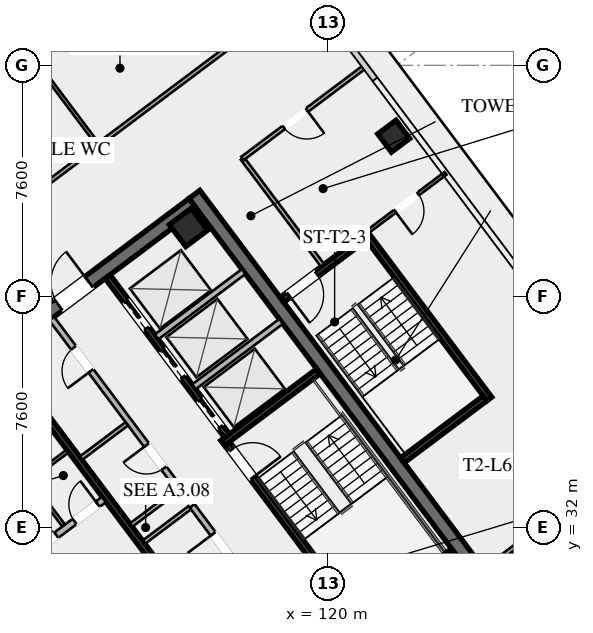
"""IFC4 building model, lengths in metres.
Left out: names, types, materials, properties, quantities, classifications, styles, units other than length and angle.
Written with IfcOpenShell. Run it as: python <this file> out.ifc"""

import sys

from ifc_helpers import new_model, si_unit, direction, frame, frame_2d, origin, origin_2d, place, context, subcontext, project, spatial, rectangle, hollow_rectangle, extrude, element, fill, save


model = new_model("IFC4")
c1 = context("Model", 3, precision=1e-05, world=origin(), true_north=direction((0.0, 1.0)))
c2 = subcontext(c1, "Body", "Model", "MODEL_VIEW")
j1 = project(units=[si_unit("LENGTHUNIT", "METRE"), si_unit("PLANEANGLEUNIT", "RADIAN")], contexts=[c1])
p1 = place(None, origin())
s1 = spatial("IfcSite", under=j1, at=p1, CompositionType="ELEMENT")
p2 = place(p1, origin())
s2 = spatial("IfcBuilding", under=s1, at=p2, CompositionType="ELEMENT")
p3 = place(p2, frame((0.0, 0.0, 232.6)))
s3 = spatial("IfcBuildingStorey", under=s2, at=p3, CompositionType="ELEMENT", Elevation=232.6)
for number, where, z_axis, x_axis in (
    (1, (112.396, 21.047, 0.0), (0.0, 0.0, 1.0), (-0.6, 0.8, 0.0)),
    (2, (115.604, 42.953, 0.0), (0.0, 0.0, 1.0), (0.6, -0.8, 0.0)),
):
    element("IfcWall", number, at=place(p3, frame(where, z_axis=z_axis, x_axis=x_axis)), inside=s3, PredefinedType="SHEAR", context=c2, shape_type="SweptSolid", body=[
        extrude(rectangle(XDim=15.6, YDim=0.45, at=frame_2d((7.8, 0.0))), origin(), (0.0, 0.0, 1.0), 3.55),
    ])
p4 = place(p3, frame((103.351, 33.482, 0.0), z_axis=(0.0, 0.0, 1.0), x_axis=(0.8, 0.6, 0.0)))
e3 = element("IfcWall", 3, at=p4, inside=s3, PredefinedType="SHEAR", context=c2, shape_type="SweptSolid", body=[
    extrude(rectangle(XDim=15.26, YDim=0.45, at=frame_2d((7.63, 0.0))), origin(), (0.0, 0.0, 1.0), 3.55),
])
p5 = place(p4, frame((4.68, 0.0, 0.0)))
e4 = element("IfcOpeningElement", 4, at=p5, cuts=e3, PredefinedType="OPENING", context=c2, shape_type="SweptSolid", body=[
    extrude(rectangle(XDim=1.25, YDim=2.25, at=frame_2d((0.625, 1.125))), frame((0.0, 0.235, 0.0), z_axis=(0.0, -1.0, 0.0), x_axis=(1.0, 0.0, 0.0)), (0.0, 0.0, 1.0), 0.47),
])
p6 = place(p4, frame((9.73, 0.0, 0.0)))
e5 = element("IfcOpeningElement", 5, at=p6, cuts=e3, PredefinedType="OPENING", context=c2, shape_type="SweptSolid", body=[
    extrude(rectangle(XDim=1.25, YDim=2.25, at=frame_2d((0.625, 1.125))), frame((0.0, 0.235, 0.0), z_axis=(0.0, -1.0, 0.0), x_axis=(1.0, 0.0, 0.0)), (0.0, 0.0, 1.0), 0.47),
])
for number, where, z_axis, x_axis in (
    (6, (123.87, 30.59, 0.0), (0.0, 0.0, 1.0), (0.8, 0.6, 0.0)),
    (7, (115.41, 41.87, 0.0), (0.0, 0.0, 1.0), (0.8, 0.6, 0.0)),
):
    element("IfcColumn", number, at=place(p3, frame(where, z_axis=z_axis, x_axis=x_axis)), inside=s3, PredefinedType="COLUMN", context=c2, shape_type="SweptSolid", body=[
        extrude(hollow_rectangle(XDim=0.9, YDim=0.9, WallThickness=0.04, at=origin_2d()), origin(), (0.0, 0.0, 1.0), 3.37),
    ])
p7 = place(p3, frame((122.16, 44.87, -0.175), z_axis=(0.0, 0.0, 1.0), x_axis=(0.799999996291, 0.600000004945, 0.0)))
e8 = element("IfcColumn", 8, at=p7, inside=s3, PredefinedType="COLUMN", context=c2, shape_type="SweptSolid", body=[
    extrude(hollow_rectangle(XDim=0.75, YDim=0.75, WallThickness=0.032, at=origin_2d()), origin(), (0.0, 0.0, 1.0), 3.545),
])
p8 = place(p3, frame((111.44, 29.08, 0.0), z_axis=(0.0, 0.0, 1.0), x_axis=(-0.59999041401, 0.800007189403, 0.0)))
e9 = element("IfcWall", 9, at=p8, inside=s3, PredefinedType="SHEAR", context=c2, shape_type="SweptSolid", body=[
    extrude(rectangle(XDim=8.15, YDim=0.2, at=frame_2d((4.075, 0.0))), origin(), (0.0, 0.0, 1.0), 3.37),
])
p9 = place(p8, frame((0.45, 0.0, 0.0)))
e10 = element("IfcOpeningElement", 10, at=p9, cuts=e9, PredefinedType="OPENING", context=c2, shape_type="SweptSolid", body=[
    extrude(rectangle(XDim=1.15, YDim=2.2, at=frame_2d((0.575, 1.1))), frame((0.0, 0.11, 0.0), z_axis=(0.0, -1.0, 0.0), x_axis=(1.0, 0.0, 0.0)), (0.0, 0.0, 1.0), 0.22),
])
p10 = place(p3, frame((116.56, 34.92, 0.0), z_axis=(0.0, 0.0, 1.0), x_axis=(0.59999041401, -0.800007189403, 0.0)))
e11 = element("IfcWall", 11, at=p10, inside=s3, PredefinedType="SHEAR", context=c2, shape_type="SweptSolid", body=[
    extrude(rectangle(XDim=8.15, YDim=0.2, at=frame_2d((4.075, 0.0))), origin(), (0.0, 0.0, 1.0), 3.37),
])
p11 = place(p10, frame((0.45, 0.0, 0.0)))
e12 = element("IfcOpeningElement", 12, at=p11, cuts=e11, PredefinedType="OPENING", context=c2, shape_type="SweptSolid", body=[
    extrude(rectangle(XDim=1.15, YDim=2.2, at=frame_2d((0.575, 1.1))), frame((0.0, 0.11, 0.0), z_axis=(0.0, -1.0, 0.0), x_axis=(1.0, 0.0, 0.0)), (0.0, 0.0, 1.0), 0.22),
])
for number, where, z_axis, x_axis in (
    (13, (116.54, 34.78, 0.0), (0.0, 0.0, 1.0), (0.8, 0.6, 0.0)),
    (14, (120.98, 28.86, 0.0), (0.0, 0.0, 1.0), (0.8, 0.6, 0.0)),
):
    element("IfcWall", number, at=place(p3, frame(where, z_axis=z_axis, x_axis=x_axis)), inside=s3, PredefinedType="SHEAR", context=c2, shape_type="SweptSolid", body=[
        extrude(rectangle(XDim=3.93, YDim=0.2, at=frame_2d((1.965, 0.0))), origin(), (0.0, 0.0, 1.0), 3.37),
    ])
p12 = place(p3, frame((118.058, 25.856, 0.0), z_axis=(0.0, 0.0, 1.0), x_axis=(-0.600002657301, 0.799998007018, 0.0)))
e15 = element("IfcWall", 15, at=p12, inside=s3, PredefinedType="SHEAR", context=c2, shape_type="SweptSolid", body=[
    extrude(rectangle(XDim=14.7, YDim=0.2, at=frame_2d((7.35, 0.0))), origin(), (0.0, 0.0, 1.0), 3.37),
])
p13 = place(p3, frame((110.104, 31.028, 0.0), z_axis=(0.0, 0.0, 1.0), x_axis=(0.800018601094, 0.59997519774, 0.0)))
e16 = element("IfcWall", 16, at=p13, inside=s3, PredefinedType="SOLIDWALL", context=c2, shape_type="SweptSolid", body=[
    extrude(rectangle(XDim=3.15, YDim=0.22, at=frame_2d((1.575, 0.0))), origin(), (0.0, 0.0, 1.0), 2.723),
])
p14 = place(p13, frame((0.25, 0.0, 0.0)))
e17 = element("IfcOpeningElement", 17, at=p14, cuts=e16, PredefinedType="OPENING", context=c2, shape_type="SweptSolid", body=[
    extrude(rectangle(XDim=0.95, YDim=2.05, at=frame_2d((0.475, 1.025))), frame((0.0, 0.12, 0.0), z_axis=(0.0, -1.0, 0.0), x_axis=(1.0, 0.0, 0.0)), (0.0, 0.0, 1.0), 0.24),
])
p15 = place(p13, frame((1.95, 0.0, 0.0)))
e18 = element("IfcOpeningElement", 18, at=p15, cuts=e16, PredefinedType="OPENING", context=c2, shape_type="SweptSolid", body=[
    extrude(rectangle(XDim=0.95, YDim=2.05, at=frame_2d((0.475, 1.025))), frame((0.0, 0.12, 0.0), z_axis=(0.0, -1.0, 0.0), x_axis=(1.0, 0.0, 0.0)), (0.0, 0.0, 1.0), 0.24),
])
p16 = place(p3, frame((112.75, 40.25, 0.0), z_axis=(0.0, 0.0, 1.0), x_axis=(0.599994036198, -0.800004472816, 0.0)))
e19 = element("IfcWall", 19, at=p16, inside=s3, PredefinedType="SHEAR", context=c2, shape_type="SweptSolid", body=[
    extrude(rectangle(XDim=6.55, YDim=0.2, at=frame_2d((3.275, 0.0))), origin(), (0.0, 0.0, 1.0), 3.37),
])
p17 = place(p16, frame((5.075, 0.0, 0.0)))
e20 = element("IfcOpeningElement", 20, at=p17, cuts=e19, PredefinedType="OPENING", context=c2, shape_type="SweptSolid", body=[
    extrude(rectangle(XDim=1.1, YDim=2.2, at=frame_2d((0.55, 1.1))), frame((0.0, 0.11, 0.0), z_axis=(0.0, -1.0, 0.0), x_axis=(1.0, 0.0, 0.0)), (0.0, 0.0, 1.0), 0.22),
])
p18 = place(p16, frame((3.025, 0.0, 0.0)))
e21 = element("IfcOpeningElement", 21, at=p18, cuts=e19, PredefinedType="OPENING", context=c2, shape_type="SweptSolid", body=[
    extrude(rectangle(XDim=1.1, YDim=2.2, at=frame_2d((0.55, 1.1))), frame((0.0, 0.11, 0.0), z_axis=(0.0, -1.0, 0.0), x_axis=(1.0, 0.0, 0.0)), (0.0, 0.0, 1.0), 0.22),
])
p19 = place(p16, frame((1.025, 0.0, 0.0)))
e22 = element("IfcOpeningElement", 22, at=p19, cuts=e19, PredefinedType="OPENING", context=c2, shape_type="SweptSolid", body=[
    extrude(rectangle(XDim=1.1, YDim=2.2, at=frame_2d((0.55, 1.1))), frame((0.0, 0.11, 0.0), z_axis=(0.0, -1.0, 0.0), x_axis=(1.0, 0.0, 0.0)), (0.0, 0.0, 1.0), 0.22),
])
for number, where, z_axis, x_axis in (
    (23, (115.59, 36.63, 0.0), (0.0, 0.0, 1.0), (0.8, 0.6, 0.0)),
    (24, (114.36, 38.27, 0.0), (0.0, 0.0, 1.0), (0.8, 0.6, 0.0)),
):
    element("IfcWall", number, at=place(p3, frame(where, z_axis=z_axis, x_axis=x_axis)), inside=s3, PredefinedType="SOLIDWALL", context=c2, shape_type="SweptSolid", body=[
        extrude(rectangle(XDim=3.58, YDim=0.2, at=frame_2d((1.79, 0.0))), origin(), (0.0, 0.0, 1.0), 3.37),
    ])
p20 = place(p3, frame((111.296, 32.072, 0.0), z_axis=(0.0, 0.0, 1.0), x_axis=(-0.59995887973, 0.800030838552, 0.0)))
e25 = element("IfcWall", 25, at=p20, inside=s3, PredefinedType="PARTITIONING", context=c2, shape_type="SweptSolid", body=[
    extrude(rectangle(XDim=3.8, YDim=0.11, at=frame_2d((1.9, 0.0))), origin(), (0.0, 0.0, 1.0), 2.723),
])
p21 = place(p3, frame((108.91, 32.62, 0.0), z_axis=(0.0, 0.0, 1.0), x_axis=(0.800018601094, 0.59997519774, 0.0)))
e26 = element("IfcWall", 26, at=p21, inside=s3, PredefinedType="PARTITIONING", context=c2, shape_type="SweptSolid", body=[
    extrude(rectangle(XDim=3.15, YDim=0.11, at=frame_2d((1.575, 0.0))), origin(), (0.0, 0.0, 1.0), 2.723),
])
p22 = place(p3, frame((119.73, 27.11, 0.0), z_axis=(0.0, 0.0, 1.0), x_axis=(-0.600005580459, 0.799995814625, 0.0)))
e27 = element("IfcWall", 27, at=p22, inside=s3, PredefinedType="SOLIDWALL", context=c2, shape_type="SweptSolid", body=[
    extrude(rectangle(XDim=7.0, YDim=0.2, at=frame_2d((3.5, 0.0))), origin(), (0.0, 0.0, 1.0), 2.723),
])
p23 = place(p22, frame((0.85, 0.0, 0.0)))
e28 = element("IfcOpeningElement", 28, at=p23, cuts=e27, PredefinedType="OPENING", context=c2, shape_type="SweptSolid", body=[
    extrude(rectangle(XDim=0.95, YDim=2.05, at=frame_2d((0.475, 1.025))), frame((0.0, 0.11, 0.0), z_axis=(0.0, -1.0, 0.0), x_axis=(1.0, 0.0, 0.0)), (0.0, 0.0, 1.0), 0.22),
])
p24 = place(p22, frame((4.8, 0.0, 0.0)))
e29 = element("IfcOpeningElement", 29, at=p24, cuts=e27, PredefinedType="OPENING", context=c2, shape_type="SweptSolid", body=[
    extrude(rectangle(XDim=1.05, YDim=2.2, at=frame_2d((0.525, 1.1))), frame((0.0, 0.11, 0.0), z_axis=(0.0, -1.0, 0.0), x_axis=(1.0, 0.0, 0.0)), (0.0, 0.0, 1.0), 0.22),
])
p25 = place(p3, frame((113.946, 31.522, 0.0), z_axis=(0.0, 0.0, 1.0), x_axis=(0.8, 0.6, 0.0)))
e30 = element("IfcWall", 30, at=p25, inside=s3, PredefinedType="PARTITIONING", context=c2, shape_type="SweptSolid", body=[
    extrude(rectangle(XDim=1.88, YDim=0.135, at=frame_2d((0.94, 0.0))), origin(), (0.0, 0.0, 1.0), 2.723),
])
p26 = place(p3, frame((115.11, 33.27, 0.0), z_axis=(0.0, 0.0, 1.0), x_axis=(-0.600011160345, 0.79999162962, 0.0)))
e31 = element("IfcWall", 31, at=p26, inside=s3, PredefinedType="SOLIDWALL", context=c2, shape_type="SweptSolid", body=[
    extrude(rectangle(XDim=7.0, YDim=0.2, at=frame_2d((3.5, 0.0))), origin(), (0.0, 0.0, 1.0), 2.723),
])
p27 = place(p26, frame((0.85, 0.0, 0.0)))
e32 = element("IfcOpeningElement", 32, at=p27, cuts=e31, PredefinedType="OPENING", context=c2, shape_type="SweptSolid", body=[
    extrude(rectangle(XDim=0.95, YDim=2.05, at=frame_2d((0.475, 1.025))), frame((0.0, 0.11, 0.0), z_axis=(0.0, -1.0, 0.0), x_axis=(1.0, 0.0, 0.0)), (0.0, 0.0, 1.0), 0.22),
])
p28 = place(p26, frame((4.85, 0.0, 0.0)))
e33 = element("IfcOpeningElement", 33, at=p28, cuts=e31, PredefinedType="OPENING", context=c2, shape_type="SweptSolid", body=[
    extrude(rectangle(XDim=0.95, YDim=2.05, at=frame_2d((0.475, 1.025))), frame((0.0, 0.11, 0.0), z_axis=(0.0, -1.0, 0.0), x_axis=(1.0, 0.0, 0.0)), (0.0, 0.0, 1.0), 0.22),
])
p29 = place(p3, frame((113.526, 32.082, 0.0), z_axis=(0.0, 0.0, 1.0), x_axis=(0.800046745961, 0.599937666993, 0.0)))
e34 = element("IfcWall", 34, at=p29, inside=s3, PredefinedType="PARTITIONING", context=c2, shape_type="SweptSolid", body=[
    extrude(rectangle(XDim=1.88, YDim=0.135, at=frame_2d((0.94, 0.0))), origin(), (0.0, 0.0, 1.0), 2.723),
])
p30 = place(p3, frame((111.876, 34.282, 0.0), z_axis=(0.0, 0.0, 1.0), x_axis=(0.8, 0.6, 0.0)))
e35 = element("IfcWall", 35, at=p30, inside=s3, PredefinedType="PARTITIONING", context=c2, shape_type="SweptSolid", body=[
    extrude(rectangle(XDim=1.88, YDim=0.135, at=frame_2d((0.94, 0.0))), origin(), (0.0, 0.0, 1.0), 2.723),
])
p31 = place(p3, frame((125.304, 36.228, 0.0), z_axis=(0.0, 0.0, 1.0), x_axis=(-0.59998851072, 0.800008616831, 0.0)))
e36 = element("IfcWall", 36, at=p31, inside=s3, PredefinedType="SHEAR", context=c2, shape_type="SweptSolid", body=[
    extrude(rectangle(XDim=6.8, YDim=0.2, at=frame_2d((3.4, 0.0))), origin(), (0.0, 0.0, 1.0), 3.37),
])
p32 = place(p3, frame((121.204, 41.528, 0.0), z_axis=(0.0, 0.0, 1.0), x_axis=(-0.800017232136, -0.599977023131, 0.0)))
e37 = element("IfcWall", 37, at=p32, inside=s3, PredefinedType="SHEAR", context=c2, shape_type="SweptSolid", body=[
    extrude(rectangle(XDim=3.4, YDim=0.2, at=frame_2d((1.7, 0.0))), origin(), (0.0, 0.0, 1.0), 3.37),
])
p33 = place(p32, frame((1.975, 0.0, 0.0)))
e38 = element("IfcOpeningElement", 38, at=p33, cuts=e37, PredefinedType="OPENING", context=c2, shape_type="SweptSolid", body=[
    extrude(rectangle(XDim=1.15, YDim=2.2, at=frame_2d((0.575, 1.1))), frame((0.0, 0.11, 0.0), z_axis=(0.0, -1.0, 0.0), x_axis=(1.0, 0.0, 0.0)), (0.0, 0.0, 1.0), 0.22),
])
p34 = place(p3, frame((122.444, 34.208, 0.0), z_axis=(0.0, 0.0, 1.0), x_axis=(0.79999138319, 0.600011488909, 0.0)))
e39 = element("IfcWall", 39, at=p34, inside=s3, PredefinedType="SHEAR", context=c2, shape_type="SweptSolid", body=[
    extrude(rectangle(XDim=3.4, YDim=0.2, at=frame_2d((1.7, 0.0))), origin(), (0.0, 0.0, 1.0), 3.37),
])
p35 = place(p3, frame((119.824, 40.618, 0.0), z_axis=(0.0, 0.0, 1.0), x_axis=(-0.599982243973, 0.800013316712, 0.0)))
e40 = element("IfcWall", 40, at=p35, inside=s3, PredefinedType="PARTITIONING", context=c2, shape_type="SweptSolid", body=[
    extrude(rectangle(XDim=4.4, YDim=0.135, at=frame_2d((2.2, 0.0))), origin(), (0.0, 0.0, 1.0), 2.723),
])
p36 = place(p3, frame((99.736, 35.052, 0.0), z_axis=(0.0, 0.0, 1.0), x_axis=(0.799997387685, 0.600003483071, 0.0)))
e41 = element("IfcWall", 41, at=p36, inside=s3, PredefinedType="PARTITIONING", context=c2, shape_type="SweptSolid", body=[
    extrude(rectangle(XDim=22.43, YDim=0.135, at=frame_2d((11.215, 0.0))), origin(), (0.0, 0.0, 1.0), 2.723),
])
p37 = place(p36, frame((0.3, 0.0, 0.0)))
e42 = element("IfcOpeningElement", 42, at=p37, cuts=e41, PredefinedType="OPENING", context=c2, shape_type="SweptSolid", body=[
    extrude(rectangle(XDim=0.95, YDim=2.05, at=frame_2d((0.475, 1.025))), frame((0.0, 0.077, 0.0), z_axis=(0.0, -1.0, 0.0), x_axis=(1.0, 0.0, 0.0)), (0.0, 0.0, 1.0), 0.155),
])
p38 = place(p36, frame((9.423, 0.0, 0.0)))
e43 = element("IfcOpeningElement", 43, at=p38, cuts=e41, PredefinedType="OPENING", context=c2, shape_type="SweptSolid", body=[
    extrude(rectangle(XDim=0.95, YDim=2.05, at=frame_2d((0.475, 1.025))), frame((0.0, 0.077, 0.0), z_axis=(0.0, -1.0, 0.0), x_axis=(1.0, 0.0, 0.0)), (0.0, 0.0, 1.0), 0.155),
])
p39 = place(p36, frame((21.18, 0.0, 0.0)))
e44 = element("IfcOpeningElement", 44, at=p39, cuts=e41, PredefinedType="OPENING", context=c2, shape_type="SweptSolid", body=[
    extrude(rectangle(XDim=0.95, YDim=2.05, at=frame_2d((0.475, 1.025))), frame((0.0, 0.077, 0.0), z_axis=(0.0, -1.0, 0.0), x_axis=(1.0, 0.0, 0.0)), (0.0, 0.0, 1.0), 0.155),
])
p40 = place(p3, frame((112.392, 44.644, 0.0), z_axis=(0.0, 0.0, 1.0), x_axis=(-0.6, 0.8, 0.0)))
e45 = element("IfcWall", 45, at=p40, inside=s3, PredefinedType="PARTITIONING", context=c2, shape_type="SweptSolid", body=[
    extrude(rectangle(XDim=3.8, YDim=0.11, at=frame_2d((1.9, 0.0))), origin(), (0.0, 0.0, 1.0), 2.723),
])
p41 = place(p3, frame((121.224, 47.168, 0.0), z_axis=(0.0, 0.0, 1.0), x_axis=(-0.8, -0.6, 0.0)))
e46 = element("IfcWall", 46, at=p41, inside=s3, PredefinedType="PARTITIONING", context=c2, shape_type="SweptSolid", body=[
    extrude(rectangle(XDim=5.05, YDim=0.135, at=frame_2d((2.525, 0.0))), origin(), (0.0, 0.0, 1.0), 2.723),
])
p42 = place(p41, frame((2.4, 0.0, 0.0)))
e47 = element("IfcOpeningElement", 47, at=p42, cuts=e46, PredefinedType="OPENING", context=c2, shape_type="SweptSolid", body=[
    extrude(rectangle(XDim=0.95, YDim=2.05, at=frame_2d((0.475, 1.025))), frame((0.0, 0.077, 0.0), z_axis=(0.0, -1.0, 0.0), x_axis=(1.0, 0.0, 0.0)), (0.0, 0.0, 1.0), 0.155),
])
p43 = place(p3, frame((125.208, 30.656, 0.0), z_axis=(0.0, 0.0, 1.0), x_axis=(0.8, 0.6, 0.0)))
e48 = element("IfcWall", 48, at=p43, inside=s3, PredefinedType="PARTITIONING", context=c2, shape_type="SweptSolid", body=[
    extrude(rectangle(XDim=6.72, YDim=0.135, at=frame_2d((3.36, 0.0))), origin(), (0.0, 0.0, 1.0), 2.723),
])
p44 = place(p3, frame((123.864, 43.648, 0.0), z_axis=(0.0, 0.0, 1.0), x_axis=(-0.800018310174, -0.599975585658, 0.0)))
e49 = element("IfcWall", 49, at=p44, inside=s3, PredefinedType="PARTITIONING", context=c2, shape_type="SweptSolid", body=[
    extrude(rectangle(XDim=3.2, YDim=0.11, at=frame_2d((1.6, 0.0))), origin(), (0.0, 0.0, 1.0), 2.723),
])
p45 = place(p44, frame((1.125, 0.0, 0.0)))
e50 = element("IfcOpeningElement", 50, at=p45, cuts=e49, PredefinedType="OPENING", context=c2, shape_type="SweptSolid", body=[
    extrude(rectangle(XDim=0.95, YDim=2.05, at=frame_2d((0.475, 1.025))), frame((0.0, 0.065, 0.0), z_axis=(0.0, -1.0, 0.0), x_axis=(1.0, 0.0, 0.0)), (0.0, 0.0, 1.0), 0.13),
])
p46 = place(p3, frame((112.15, 18.5, 0.0), z_axis=(0.0, 0.0, 1.0), x_axis=(-0.599998104681, 0.800001421485, 0.0)))
e51 = element("IfcWall", 51, at=p46, inside=s3, PredefinedType="PARTITIONING", context=c2, shape_type="SweptSolid", body=[
    extrude(rectangle(XDim=20.61, YDim=0.135, at=frame_2d((10.305, 0.0))), origin(), (0.0, 0.0, 1.0), 2.723),
])
p47 = place(p46, frame((19.36, 0.0, 0.0)))
e52 = element("IfcOpeningElement", 52, at=p47, cuts=e51, PredefinedType="OPENING", context=c2, shape_type="SweptSolid", body=[
    extrude(rectangle(XDim=0.95, YDim=2.05, at=frame_2d((0.475, 1.025))), frame((0.0, 0.077, 0.0), z_axis=(0.0, -1.0, 0.0), x_axis=(1.0, 0.0, 0.0)), (0.0, 0.0, 1.0), 0.155),
])
p48 = place(p6, origin())
e53 = element("IfcDoor", 53, at=p48, inside=s3, OperationType="SINGLE_SWING_RIGHT", PredefinedType="DOOR", context=c2, shape_type="SweptSolid", body=[
    extrude(rectangle(XDim=1.25, YDim=2.25, at=frame_2d((0.625, 1.125))), frame((0.0, 0.025, 0.0), z_axis=(0.0, -1.0, 0.0), x_axis=(1.0, 0.0, 0.0)), (0.0, 0.0, 1.0), 0.05),
])
fill(e5, e53)
p49 = place(p11, origin())
e54 = element("IfcDoor", 54, at=p49, inside=s3, OperationType="SINGLE_SWING_RIGHT", PredefinedType="DOOR", context=c2, shape_type="SweptSolid", body=[
    extrude(rectangle(XDim=1.15, YDim=2.2, at=frame_2d((0.575, 1.1))), frame((0.0, 0.025, 0.0), z_axis=(0.0, -1.0, 0.0), x_axis=(1.0, 0.0, 0.0)), (0.0, 0.0, 1.0), 0.05),
])
fill(e12, e54)
p50 = place(p14, origin())
e55 = element("IfcDoor", 55, at=p50, inside=s3, OperationType="SINGLE_SWING_LEFT", PredefinedType="DOOR", context=c2, shape_type="SweptSolid", body=[
    extrude(rectangle(XDim=0.95, YDim=2.05, at=frame_2d((0.475, 1.025))), frame((0.0, 0.025, 0.0), z_axis=(0.0, -1.0, 0.0), x_axis=(1.0, 0.0, 0.0)), (0.0, 0.0, 1.0), 0.05),
])
fill(e17, e55)
p51 = place(p15, origin())
e56 = element("IfcDoor", 56, at=p51, inside=s3, OperationType="SINGLE_SWING_RIGHT", PredefinedType="DOOR", context=c2, shape_type="SweptSolid", body=[
    extrude(rectangle(XDim=0.95, YDim=2.05, at=frame_2d((0.475, 1.025))), frame((0.0, 0.025, 0.0), z_axis=(0.0, -1.0, 0.0), x_axis=(1.0, 0.0, 0.0)), (0.0, 0.0, 1.0), 0.05),
])
fill(e18, e56)
p52 = place(p24, origin())
e57 = element("IfcDoor", 57, at=p52, inside=s3, OperationType="SINGLE_SWING_RIGHT", PredefinedType="DOOR", context=c2, shape_type="SweptSolid", body=[
    extrude(rectangle(XDim=1.05, YDim=2.2, at=frame_2d((0.525, 1.1))), frame((0.0, 0.025, 0.0), z_axis=(0.0, -1.0, 0.0), x_axis=(1.0, 0.0, 0.0)), (0.0, 0.0, 1.0), 0.05),
])
fill(e29, e57)
p53 = place(p27, origin())
e58 = element("IfcDoor", 58, at=p53, inside=s3, OperationType="SINGLE_SWING_RIGHT", PredefinedType="DOOR", context=c2, shape_type="SweptSolid", body=[
    extrude(rectangle(XDim=0.95, YDim=2.05, at=frame_2d((0.475, 1.025))), frame((0.0, 0.025, 0.0), z_axis=(0.0, -1.0, 0.0), x_axis=(1.0, 0.0, 0.0)), (0.0, 0.0, 1.0), 0.05),
])
fill(e32, e58)
p54 = place(p28, origin())
e59 = element("IfcDoor", 59, at=p54, inside=s3, OperationType="SINGLE_SWING_LEFT", PredefinedType="DOOR", context=c2, shape_type="SweptSolid", body=[
    extrude(rectangle(XDim=0.95, YDim=2.05, at=frame_2d((0.475, 1.025))), frame((0.0, 0.025, 0.0), z_axis=(0.0, -1.0, 0.0), x_axis=(1.0, 0.0, 0.0)), (0.0, 0.0, 1.0), 0.05),
])
fill(e33, e59)
p55 = place(p33, origin())
e60 = element("IfcDoor", 60, at=p55, inside=s3, OperationType="SINGLE_SWING_RIGHT", PredefinedType="DOOR", context=c2, shape_type="SweptSolid", body=[
    extrude(rectangle(XDim=1.15, YDim=2.2, at=frame_2d((0.575, 1.1))), frame((0.0, 0.025, 0.0), z_axis=(0.0, -1.0, 0.0), x_axis=(1.0, 0.0, 0.0)), (0.0, 0.0, 1.0), 0.05),
])
fill(e38, e60)
p56 = place(p42, origin())
e61 = element("IfcDoor", 61, at=p56, inside=s3, OperationType="SINGLE_SWING_LEFT", PredefinedType="DOOR", context=c2, shape_type="SweptSolid", body=[
    extrude(rectangle(XDim=0.95, YDim=2.05, at=frame_2d((0.475, 1.025))), frame((0.0, 0.025, 0.0), z_axis=(0.0, -1.0, 0.0), x_axis=(1.0, 0.0, 0.0)), (0.0, 0.0, 1.0), 0.05),
])
fill(e47, e61)
p57 = place(p45, origin())
e62 = element("IfcDoor", 62, at=p57, inside=s3, OperationType="SINGLE_SWING_RIGHT", PredefinedType="DOOR", context=c2, shape_type="SweptSolid", body=[
    extrude(rectangle(XDim=0.95, YDim=2.05, at=frame_2d((0.475, 1.025))), frame((0.0, 0.025, 0.0), z_axis=(0.0, -1.0, 0.0), x_axis=(1.0, 0.0, 0.0)), (0.0, 0.0, 1.0), 0.05),
])
fill(e50, e62)
p58 = place(p17, origin())
e63 = element("IfcDoor", 63, at=p58, inside=s3, OperationType="SLIDING_TO_LEFT", PredefinedType="DOOR", context=c2, shape_type="SweptSolid", body=[
    extrude(rectangle(XDim=1.1, YDim=2.2, at=frame_2d((0.55, 1.1))), frame((0.0, 0.025, 0.0), z_axis=(0.0, -1.0, 0.0), x_axis=(1.0, 0.0, 0.0)), (0.0, 0.0, 1.0), 0.05),
])
fill(e20, e63)
p59 = place(p18, origin())
e64 = element("IfcDoor", 64, at=p59, inside=s3, OperationType="SLIDING_TO_LEFT", PredefinedType="DOOR", context=c2, shape_type="SweptSolid", body=[
    extrude(rectangle(XDim=1.1, YDim=2.2, at=frame_2d((0.55, 1.1))), frame((0.0, 0.025, 0.0), z_axis=(0.0, -1.0, 0.0), x_axis=(1.0, 0.0, 0.0)), (0.0, 0.0, 1.0), 0.05),
])
fill(e21, e64)
p60 = place(p19, origin())
e65 = element("IfcDoor", 65, at=p60, inside=s3, OperationType="SLIDING_TO_LEFT", PredefinedType="DOOR", context=c2, shape_type="SweptSolid", body=[
    extrude(rectangle(XDim=1.1, YDim=2.2, at=frame_2d((0.55, 1.1))), frame((0.0, 0.025, 0.0), z_axis=(0.0, -1.0, 0.0), x_axis=(1.0, 0.0, 0.0)), (0.0, 0.0, 1.0), 0.05),
])
fill(e22, e65)
save(model, sys.argv[1])
